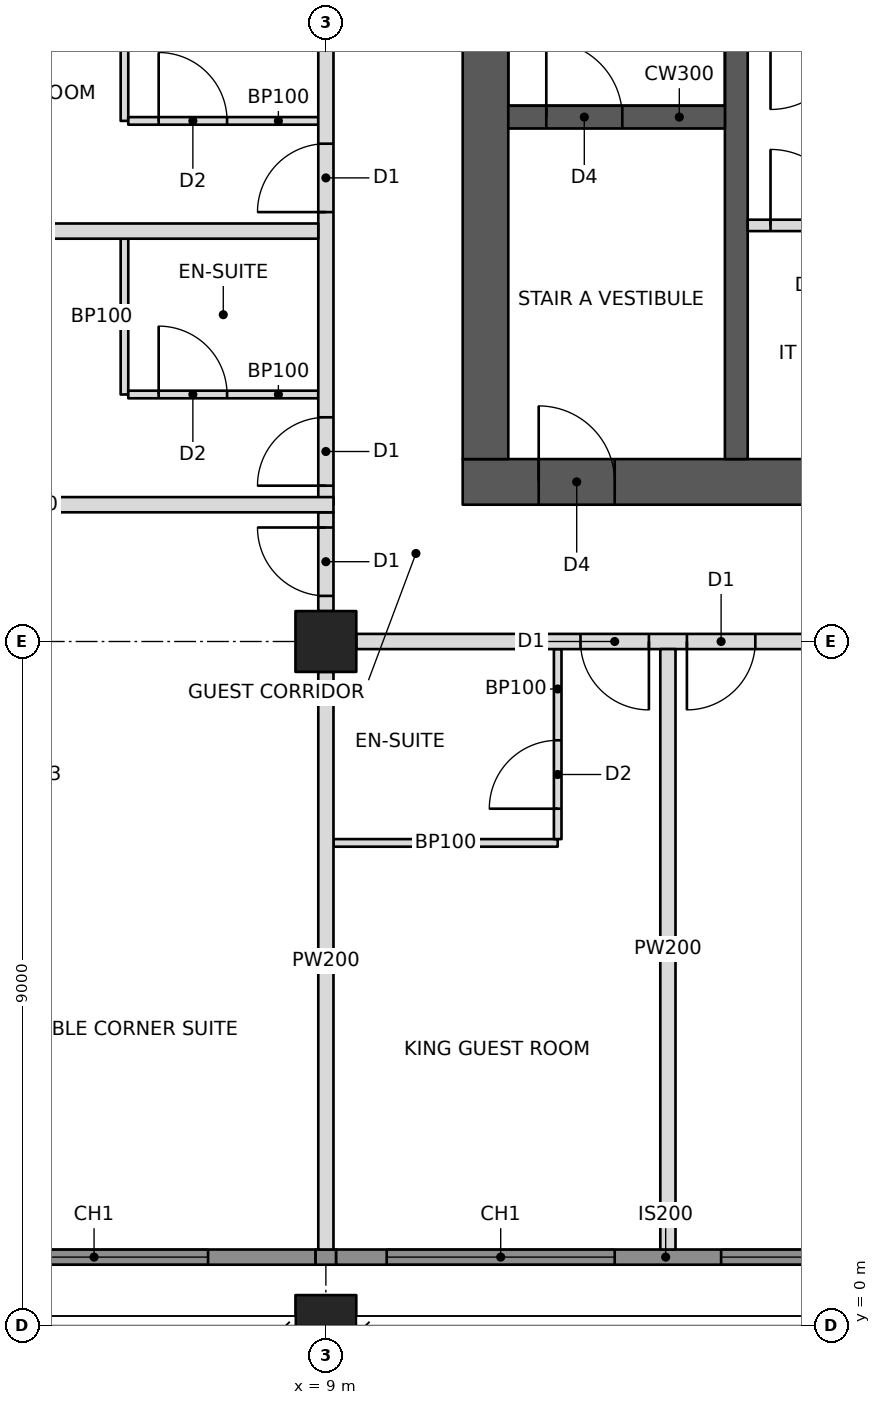
"""IFC4 building model, lengths in metres.
Left out: names, types, materials, properties, quantities, classifications, styles, units other than length and angle.
Written with IfcOpenShell. Run it as: python <this file> out.ifc"""

import sys

from ifc_helpers import new_model, si_unit, direction, frame, frame_2d, origin, origin_2d, place, context, subcontext, project, spatial, rectangle, hollow_rectangle, extrude, element, fill, save


model = new_model("IFC4")
c1 = context("Model", 3, precision=1e-05, world=origin(), true_north=direction((0.0, 1.0)))
c2 = subcontext(c1, "Body", "Model", "MODEL_VIEW")
j1 = project(units=[si_unit("LENGTHUNIT", "METRE"), si_unit("PLANEANGLEUNIT", "RADIAN")], contexts=[c1])
p1 = place(None, origin())
s1 = spatial("IfcSite", under=j1, at=p1, CompositionType="ELEMENT")
p2 = place(p1, origin())
s2 = spatial("IfcBuilding", under=s1, at=p2, CompositionType="ELEMENT")
p3 = place(p2, frame((0.0, 0.0, 230.2)))
s3 = spatial("IfcBuildingStorey", under=s2, at=p3, CompositionType="ELEMENT", Elevation=230.2)
p4 = place(p3, frame((9.0, 0.0, 0.0), z_axis=(0.0, 0.0, 1.0), x_axis=(1.0, 0.0, 0.0)))
e1 = element("IfcColumn", 1, at=p4, inside=s3, PredefinedType="COLUMN", context=c2, shape_type="SweptSolid", body=[
    extrude(hollow_rectangle(XDim=0.8, YDim=0.8, WallThickness=0.05, at=origin_2d()), origin(), (0.0, 0.0, 1.0), 3.6),
])
p5 = place(p3, frame((9.0, 9.0, 0.0), z_axis=(0.0, 0.0, 1.0), x_axis=(1.0, 0.0, 0.0)))
e2 = element("IfcColumn", 2, at=p5, inside=s3, PredefinedType="COLUMN", context=c2, shape_type="SweptSolid", body=[
    extrude(hollow_rectangle(XDim=0.8, YDim=0.8, WallThickness=0.1, at=origin_2d()), origin(), (0.0, 0.0, 1.0), 3.6),
])
p6 = place(p3, frame((10.8, 11.1, 0.0), z_axis=(0.0, 0.0, 1.0), x_axis=(1.0, 0.0, 0.0)))
e3 = element("IfcWall", 3, at=p6, inside=s3, PredefinedType="SHEAR", context=c2, shape_type="SweptSolid", body=[
    extrude(rectangle(XDim=23.4, YDim=0.6, at=frame_2d((11.7, 0.0))), origin(), (0.0, 0.0, 1.0), 3.6),
])
p7 = place(p6, frame((1.0, 0.0, 0.0)))
e4 = element("IfcOpeningElement", 4, at=p7, cuts=e3, PredefinedType="OPENING", context=c2, shape_type="SweptSolid", body=[
    extrude(rectangle(XDim=1.0, YDim=2.1, at=frame_2d((0.5, 1.05))), frame((0.0, 0.31, 0.0), z_axis=(0.0, -1.0, 0.0), x_axis=(1.0, 0.0, 0.0)), (0.0, 0.0, 1.0), 0.62),
])
p8 = place(p6, frame((17.2, 0.0, 0.0)))
e5 = element("IfcOpeningElement", 5, at=p8, cuts=e3, PredefinedType="OPENING", context=c2, shape_type="SweptSolid", body=[
    extrude(rectangle(XDim=1.8, YDim=2.1, at=frame_2d((0.9, 1.05))), frame((0.0, 0.31, 0.0), z_axis=(0.0, -1.0, 0.0), x_axis=(1.0, 0.0, 0.0)), (0.0, 0.0, 1.0), 0.62),
])
p9 = place(p3, frame((11.1, 11.4, 0.0), z_axis=(0.0, 0.0, 1.0), x_axis=(0.0, 1.0, 0.0)))
e6 = element("IfcWall", 6, at=p9, inside=s3, PredefinedType="SHEAR", context=c2, shape_type="SweptSolid", body=[
    extrude(rectangle(XDim=13.2, YDim=0.6, at=frame_2d((6.6, 0.0))), origin(), (0.0, 0.0, 1.0), 3.6),
])
p10 = place(p3, frame((14.4, 11.4, 0.0), z_axis=(0.0, 0.0, 1.0), x_axis=(0.0, 1.0, 0.0)))
e7 = element("IfcWall", 7, at=p10, inside=s3, PredefinedType="SHEAR", context=c2, shape_type="SweptSolid", body=[
    extrude(rectangle(XDim=13.2, YDim=0.3, at=frame_2d((6.6, 0.0))), origin(), (0.0, 0.0, 1.0), 3.6),
])
p11 = place(p3, frame((11.4, 15.9, 0.0), z_axis=(0.0, 0.0, 1.0), x_axis=(1.0, 0.0, 0.0)))
e8 = element("IfcWall", 8, at=p11, inside=s3, PredefinedType="SHEAR", context=c2, shape_type="SweptSolid", body=[
    extrude(rectangle(XDim=2.85, YDim=0.3, at=frame_2d((1.425, 0.0))), origin(), (0.0, 0.0, 1.0), 3.6),
])
p12 = place(p11, frame((0.5, 0.0, 0.0)))
e9 = element("IfcOpeningElement", 9, at=p12, cuts=e8, PredefinedType="OPENING", context=c2, shape_type="SweptSolid", body=[
    extrude(rectangle(XDim=1.0, YDim=2.1, at=frame_2d((0.5, 1.05))), frame((0.0, 0.16, 0.0), z_axis=(0.0, -1.0, 0.0), x_axis=(1.0, 0.0, 0.0)), (0.0, 0.0, 1.0), 0.32),
])
p13 = place(p3, frame((3.0, 0.9, 0.0), z_axis=(0.0, 0.0, 1.0), x_axis=(1.0, 0.0, 0.0)))
e10 = element("IfcWall", 10, at=p13, inside=s3, PredefinedType="SOLIDWALL", context=c2, shape_type="SweptSolid", body=[
    extrude(rectangle(XDim=5.865, YDim=0.2, at=frame_2d((2.932, 0.0))), origin(), (0.0, 0.0, 1.0), 3.4),
])
p14 = place(p13, frame((1.45, 0.0, 0.6)))
e11 = element("IfcOpeningElement", 11, at=p14, cuts=e10, PredefinedType="OPENING", context=c2, shape_type="SweptSolid", body=[
    extrude(rectangle(XDim=3.0, YDim=2.2, at=frame_2d((1.5, 1.1))), frame((0.0, 0.11, 0.0), z_axis=(0.0, -1.0, 0.0), x_axis=(1.0, 0.0, 0.0)), (0.0, 0.0, 1.0), 0.22),
])
p15 = place(p3, frame((9.4, 9.0, 0.0), z_axis=(0.0, 0.0, 1.0), x_axis=(1.0, 0.0, 0.0)))
e12 = element("IfcWall", 12, at=p15, inside=s3, PredefinedType="PARTITIONING", context=c2, shape_type="SweptSolid", body=[
    extrude(rectangle(XDim=8.2, YDim=0.2, at=frame_2d((4.1, 0.0))), origin(), (0.0, 0.0, 1.0), 2.605),
])
p16 = place(p15, frame((2.95, 0.0, 0.0)))
e13 = element("IfcOpeningElement", 13, at=p16, cuts=e12, PredefinedType="OPENING", context=c2, shape_type="SweptSolid", body=[
    extrude(rectangle(XDim=0.9, YDim=2.1, at=frame_2d((0.45, 1.05))), frame((0.0, 0.11, 0.0), z_axis=(0.0, -1.0, 0.0), x_axis=(1.0, 0.0, 0.0)), (0.0, 0.0, 1.0), 0.22),
])
p17 = place(p15, frame((4.35, 0.0, 0.0)))
e14 = element("IfcOpeningElement", 14, at=p17, cuts=e12, PredefinedType="OPENING", context=c2, shape_type="SweptSolid", body=[
    extrude(rectangle(XDim=0.9, YDim=2.1, at=frame_2d((0.45, 1.05))), frame((0.0, 0.11, 0.0), z_axis=(0.0, -1.0, 0.0), x_axis=(1.0, 0.0, 0.0)), (0.0, 0.0, 1.0), 0.22),
])
p18 = place(p3, frame((9.0, 10.8, 0.0), z_axis=(0.0, 0.0, 1.0), x_axis=(0.0, 1.0, 0.0)))
e15 = element("IfcWall", 15, at=p18, inside=s3, PredefinedType="PARTITIONING", context=c2, shape_type="SweptSolid", body=[
    extrude(rectangle(XDim=6.8, YDim=0.2, at=frame_2d((3.4, 0.0))), origin(), (0.0, 0.0, 1.0), 2.605),
])
p19 = place(p18, frame((0.25, 0.0, 0.0)))
e16 = element("IfcOpeningElement", 16, at=p19, cuts=e15, PredefinedType="OPENING", context=c2, shape_type="SweptSolid", body=[
    extrude(rectangle(XDim=0.9, YDim=2.1, at=frame_2d((0.45, 1.05))), frame((0.0, 0.11, 0.0), z_axis=(0.0, -1.0, 0.0), x_axis=(1.0, 0.0, 0.0)), (0.0, 0.0, 1.0), 0.22),
])
p20 = place(p18, frame((3.85, 0.0, 0.0)))
e17 = element("IfcOpeningElement", 17, at=p20, cuts=e15, PredefinedType="OPENING", context=c2, shape_type="SweptSolid", body=[
    extrude(rectangle(XDim=0.9, YDim=2.1, at=frame_2d((0.45, 1.05))), frame((0.0, 0.11, 0.0), z_axis=(0.0, -1.0, 0.0), x_axis=(1.0, 0.0, 0.0)), (0.0, 0.0, 1.0), 0.22),
])
p21 = place(p3, frame((1.0, 10.8, 0.0), z_axis=(0.0, 0.0, 1.0), x_axis=(1.0, 0.0, 0.0)))
e18 = element("IfcWall", 18, at=p21, inside=s3, PredefinedType="PARTITIONING", context=c2, shape_type="SweptSolid", body=[
    extrude(rectangle(XDim=8.1, YDim=0.2, at=frame_2d((4.05, 0.0))), origin(), (0.0, 0.0, 1.0), 2.604),
])
p22 = place(p3, frame((9.0, 8.6, 0.0), z_axis=(0.0, 0.0, 1.0), x_axis=(0.0, -1.0, 0.0)))
e19 = element("IfcWall", 19, at=p22, inside=s3, PredefinedType="PARTITIONING", context=c2, shape_type="SweptSolid", body=[
    extrude(rectangle(XDim=7.6, YDim=0.2, at=frame_2d((3.8, 0.0))), origin(), (0.0, 0.0, 1.0), 2.638),
])
p23 = place(p3, frame((13.5, 8.9, 0.0), z_axis=(0.0, 0.0, 1.0), x_axis=(0.0, -1.0, 0.0)))
e20 = element("IfcWall", 20, at=p23, inside=s3, PredefinedType="PARTITIONING", context=c2, shape_type="SweptSolid", body=[
    extrude(rectangle(XDim=7.9, YDim=0.2, at=frame_2d((3.95, 0.0))), origin(), (0.0, 0.0, 1.0), 2.604),
])
p24 = place(p3, frame((9.1, 6.35, 0.0), z_axis=(0.0, 0.0, 1.0), x_axis=(1.0, 0.0, 0.0)))
e21 = element("IfcWall", 21, at=p24, inside=s3, PredefinedType="PARTITIONING", context=c2, shape_type="SweptSolid", body=[
    extrude(rectangle(XDim=2.95, YDim=0.1, at=frame_2d((1.475, 0.0))), origin(), (0.0, 0.0, 1.0), 2.638),
])
p25 = place(p3, frame((12.05, 8.9, 0.0), z_axis=(0.0, 0.0, 1.0), x_axis=(0.0, -1.0, 0.0)))
e22 = element("IfcWall", 22, at=p25, inside=s3, PredefinedType="PARTITIONING", context=c2, shape_type="SweptSolid", body=[
    extrude(rectangle(XDim=2.5, YDim=0.1, at=frame_2d((1.25, 0.0))), origin(), (0.0, 0.0, 1.0), 2.604),
])
p26 = place(p25, frame((1.2, 0.0, 0.0)))
e23 = element("IfcOpeningElement", 23, at=p26, cuts=e22, PredefinedType="OPENING", context=c2, shape_type="SweptSolid", body=[
    extrude(rectangle(XDim=0.9, YDim=2.1, at=frame_2d((0.45, 1.05))), frame((0.0, 0.06, 0.0), z_axis=(0.0, -1.0, 0.0), x_axis=(1.0, 0.0, 0.0)), (0.0, 0.0, 1.0), 0.12),
])
p27 = place(p3, frame((8.9, 14.4, 0.0), z_axis=(0.0, 0.0, 1.0), x_axis=(-1.0, 0.0, 0.0)))
e24 = element("IfcWall", 24, at=p27, inside=s3, PredefinedType="PARTITIONING", context=c2, shape_type="SweptSolid", body=[
    extrude(rectangle(XDim=7.9, YDim=0.2, at=frame_2d((3.95, 0.0))), origin(), (0.0, 0.0, 1.0), 2.604),
])
p28 = place(p3, frame((6.35, 12.25, 0.0), z_axis=(0.0, 0.0, 1.0), x_axis=(0.0, 1.0, 0.0)))
e25 = element("IfcWall", 25, at=p28, inside=s3, PredefinedType="PARTITIONING", context=c2, shape_type="SweptSolid", body=[
    extrude(rectangle(XDim=2.05, YDim=0.1, at=frame_2d((1.025, 0.0))), origin(), (0.0, 0.0, 1.0), 3.4),
])
p29 = place(p3, frame((8.9, 12.25, 0.0), z_axis=(0.0, 0.0, 1.0), x_axis=(-1.0, 0.0, 0.0)))
e26 = element("IfcWall", 26, at=p29, inside=s3, PredefinedType="PARTITIONING", context=c2, shape_type="SweptSolid", body=[
    extrude(rectangle(XDim=2.5, YDim=0.1, at=frame_2d((1.25, 0.0))), origin(), (0.0, 0.0, 1.0), 2.604),
])
p30 = place(p29, frame((1.2, 0.0, 0.0)))
e27 = element("IfcOpeningElement", 27, at=p30, cuts=e26, PredefinedType="OPENING", context=c2, shape_type="SweptSolid", body=[
    extrude(rectangle(XDim=0.9, YDim=2.1, at=frame_2d((0.45, 1.05))), frame((0.0, 0.06, 0.0), z_axis=(0.0, -1.0, 0.0), x_axis=(1.0, 0.0, 0.0)), (0.0, 0.0, 1.0), 0.12),
])
p31 = place(p3, frame((6.35, 15.85, 0.0), z_axis=(0.0, 0.0, 1.0), x_axis=(0.0, 1.0, 0.0)))
e28 = element("IfcWall", 28, at=p31, inside=s3, PredefinedType="PARTITIONING", context=c2, shape_type="SweptSolid", body=[
    extrude(rectangle(XDim=2.05, YDim=0.1, at=frame_2d((1.025, 0.0))), origin(), (0.0, 0.0, 1.0), 2.604),
])
p32 = place(p3, frame((8.9, 15.85, 0.0), z_axis=(0.0, 0.0, 1.0), x_axis=(-1.0, 0.0, 0.0)))
e29 = element("IfcWall", 29, at=p32, inside=s3, PredefinedType="PARTITIONING", context=c2, shape_type="SweptSolid", body=[
    extrude(rectangle(XDim=2.5, YDim=0.1, at=frame_2d((1.25, 0.0))), origin(), (0.0, 0.0, 1.0), 2.604),
])
p33 = place(p32, frame((1.2, 0.0, 0.0)))
e30 = element("IfcOpeningElement", 30, at=p33, cuts=e29, PredefinedType="OPENING", context=c2, shape_type="SweptSolid", body=[
    extrude(rectangle(XDim=0.9, YDim=2.1, at=frame_2d((0.45, 1.05))), frame((0.0, 0.06, 0.0), z_axis=(0.0, -1.0, 0.0), x_axis=(1.0, 0.0, 0.0)), (0.0, 0.0, 1.0), 0.12),
])
p34 = place(p3, frame((9.0, 9.4, 0.0), z_axis=(0.0, 0.0, 1.0), x_axis=(0.0, 1.0, 0.0)))
e31 = element("IfcWall", 31, at=p34, inside=s3, PredefinedType="PARTITIONING", context=c2, shape_type="SweptSolid", body=[
    extrude(rectangle(XDim=1.3, YDim=0.2, at=frame_2d((0.65, 0.0))), origin(), (0.0, 0.0, 1.0), 2.605),
])
p35 = place(p34, frame((0.2, 0.0, 0.0)))
e32 = element("IfcOpeningElement", 32, at=p35, cuts=e31, PredefinedType="OPENING", context=c2, shape_type="SweptSolid", body=[
    extrude(rectangle(XDim=0.9, YDim=2.1, at=frame_2d((0.45, 1.05))), frame((0.0, 0.11, 0.0), z_axis=(0.0, -1.0, 0.0), x_axis=(1.0, 0.0, 0.0)), (0.0, 0.0, 1.0), 0.22),
])
p36 = place(p3, frame((14.55, 14.475, 0.0), z_axis=(0.0, 0.0, 1.0), x_axis=(1.0, 0.0, 0.0)))
e33 = element("IfcWall", 33, at=p36, inside=s3, PredefinedType="PARTITIONING", context=c2, shape_type="SweptSolid", body=[
    extrude(rectangle(XDim=3.3, YDim=0.15, at=frame_2d((1.65, 0.0))), origin(), (0.0, 0.0, 1.0), 3.4),
])
p37 = place(p36, frame((0.3, 0.0, 0.0)))
e34 = element("IfcOpeningElement", 34, at=p37, cuts=e33, PredefinedType="OPENING", context=c2, shape_type="SweptSolid", body=[
    extrude(rectangle(XDim=1.0, YDim=2.1, at=frame_2d((0.5, 1.05))), frame((0.0, 0.085, 0.0), z_axis=(0.0, -1.0, 0.0), x_axis=(1.0, 0.0, 0.0)), (0.0, 0.0, 1.0), 0.17),
])
p38 = place(p3, frame((8.865, 0.9, 0.0), z_axis=(0.0, 0.0, 1.0), x_axis=(1.0, 0.0, 0.0)))
e35 = element("IfcWall", 35, at=p38, inside=s3, PredefinedType="SOLIDWALL", context=c2, shape_type="SweptSolid", body=[
    extrude(rectangle(XDim=0.271, YDim=0.2, at=frame_2d((0.135, 0.0))), origin(), (0.0, 0.0, 1.0), 2.638),
])
p39 = place(p3, frame((9.135, 0.9, 0.0), z_axis=(0.0, 0.0, 1.0), x_axis=(1.0, 0.0, 0.0)))
e36 = element("IfcWall", 36, at=p39, inside=s3, PredefinedType="SOLIDWALL", context=c2, shape_type="SweptSolid", body=[
    extrude(rectangle(XDim=8.671, YDim=0.2, at=frame_2d((4.335, 0.0))), origin(), (0.0, 0.0, 1.0), 3.4),
])
p40 = place(p39, frame((0.665, 0.0, 0.6)))
e37 = element("IfcOpeningElement", 37, at=p40, cuts=e36, PredefinedType="OPENING", context=c2, shape_type="SweptSolid", body=[
    extrude(rectangle(XDim=3.0, YDim=2.2, at=frame_2d((1.5, 1.1))), frame((0.0, 0.11, 0.0), z_axis=(0.0, -1.0, 0.0), x_axis=(1.0, 0.0, 0.0)), (0.0, 0.0, 1.0), 0.22),
])
p41 = place(p39, frame((5.065, 0.0, 0.6)))
e38 = element("IfcOpeningElement", 38, at=p41, cuts=e36, PredefinedType="OPENING", context=c2, shape_type="SweptSolid", body=[
    extrude(rectangle(XDim=3.0, YDim=2.2, at=frame_2d((1.5, 1.1))), frame((0.0, 0.11, 0.0), z_axis=(0.0, -1.0, 0.0), x_axis=(1.0, 0.0, 0.0)), (0.0, 0.0, 1.0), 0.22),
])
p42 = place(p14, origin())
e39 = element("IfcWindow", 39, at=p42, inside=s3, PartitioningType="TRIPLE_PANEL_VERTICAL", PredefinedType="WINDOW", context=c2, shape_type="SweptSolid", body=[
    extrude(rectangle(XDim=3.0, YDim=2.2, at=frame_2d((1.5, 1.1))), frame((0.0, 0.03, 0.0), z_axis=(0.0, -1.0, 0.0), x_axis=(1.0, 0.0, 0.0)), (0.0, 0.0, 1.0), 0.06),
])
fill(e11, e39)
p43 = place(p40, origin())
e40 = element("IfcWindow", 40, at=p43, inside=s3, PartitioningType="TRIPLE_PANEL_VERTICAL", PredefinedType="WINDOW", context=c2, shape_type="SweptSolid", body=[
    extrude(rectangle(XDim=3.0, YDim=2.2, at=frame_2d((1.5, 1.1))), frame((0.0, 0.03, 0.0), z_axis=(0.0, -1.0, 0.0), x_axis=(1.0, 0.0, 0.0)), (0.0, 0.0, 1.0), 0.06),
])
fill(e37, e40)
p44 = place(p41, origin())
e41 = element("IfcWindow", 41, at=p44, inside=s3, PartitioningType="TRIPLE_PANEL_VERTICAL", PredefinedType="WINDOW", context=c2, shape_type="SweptSolid", body=[
    extrude(rectangle(XDim=3.0, YDim=2.2, at=frame_2d((1.5, 1.1))), frame((0.0, 0.03, 0.0), z_axis=(0.0, -1.0, 0.0), x_axis=(1.0, 0.0, 0.0)), (0.0, 0.0, 1.0), 0.06),
])
fill(e38, e41)
p45 = place(p26, frame((0.9, 0.0, 0.0), z_axis=(0.0, 0.0, 1.0), x_axis=(-1.0, 0.0, 0.0)))
e42 = element("IfcDoor", 42, at=p45, inside=s3, OperationType="SINGLE_SWING_LEFT", PredefinedType="DOOR", context=c2, shape_type="SweptSolid", body=[
    extrude(rectangle(XDim=0.9, YDim=2.1, at=frame_2d((0.45, 1.05))), frame((0.0, 0.025, 0.0), z_axis=(0.0, -1.0, 0.0), x_axis=(1.0, 0.0, 0.0)), (0.0, 0.0, 1.0), 0.05),
])
fill(e23, e42)
p46 = place(p16, frame((0.9, 0.0, 0.0), z_axis=(0.0, 0.0, 1.0), x_axis=(-1.0, 0.0, 0.0)))
e43 = element("IfcDoor", 43, at=p46, inside=s3, OperationType="SINGLE_SWING_LEFT", PredefinedType="DOOR", context=c2, shape_type="SweptSolid", body=[
    extrude(rectangle(XDim=0.9, YDim=2.1, at=frame_2d((0.45, 1.05))), frame((0.0, 0.025, 0.0), z_axis=(0.0, -1.0, 0.0), x_axis=(1.0, 0.0, 0.0)), (0.0, 0.0, 1.0), 0.05),
])
fill(e13, e43)
p47 = place(p17, frame((0.9, 0.0, 0.0), z_axis=(0.0, 0.0, 1.0), x_axis=(-1.0, 0.0, 0.0)))
e44 = element("IfcDoor", 44, at=p47, inside=s3, OperationType="SINGLE_SWING_RIGHT", PredefinedType="DOOR", context=c2, shape_type="SweptSolid", body=[
    extrude(rectangle(XDim=0.9, YDim=2.1, at=frame_2d((0.45, 1.05))), frame((0.0, 0.025, 0.0), z_axis=(0.0, -1.0, 0.0), x_axis=(1.0, 0.0, 0.0)), (0.0, 0.0, 1.0), 0.05),
])
fill(e14, e44)
p48 = place(p30, frame((0.9, 0.0, 0.0), z_axis=(0.0, 0.0, 1.0), x_axis=(-1.0, 0.0, 0.0)))
e45 = element("IfcDoor", 45, at=p48, inside=s3, OperationType="SINGLE_SWING_LEFT", PredefinedType="DOOR", context=c2, shape_type="SweptSolid", body=[
    extrude(rectangle(XDim=0.9, YDim=2.1, at=frame_2d((0.45, 1.05))), frame((0.0, 0.025, 0.0), z_axis=(0.0, -1.0, 0.0), x_axis=(1.0, 0.0, 0.0)), (0.0, 0.0, 1.0), 0.05),
])
fill(e27, e45)
p49 = place(p19, origin())
e46 = element("IfcDoor", 46, at=p49, inside=s3, OperationType="SINGLE_SWING_LEFT", PredefinedType="DOOR", context=c2, shape_type="SweptSolid", body=[
    extrude(rectangle(XDim=0.9, YDim=2.1, at=frame_2d((0.45, 1.05))), frame((0.0, 0.025, 0.0), z_axis=(0.0, -1.0, 0.0), x_axis=(1.0, 0.0, 0.0)), (0.0, 0.0, 1.0), 0.05),
])
fill(e16, e46)
p50 = place(p33, frame((0.9, 0.0, 0.0), z_axis=(0.0, 0.0, 1.0), x_axis=(-1.0, 0.0, 0.0)))
e47 = element("IfcDoor", 47, at=p50, inside=s3, OperationType="SINGLE_SWING_LEFT", PredefinedType="DOOR", context=c2, shape_type="SweptSolid", body=[
    extrude(rectangle(XDim=0.9, YDim=2.1, at=frame_2d((0.45, 1.05))), frame((0.0, 0.025, 0.0), z_axis=(0.0, -1.0, 0.0), x_axis=(1.0, 0.0, 0.0)), (0.0, 0.0, 1.0), 0.05),
])
fill(e30, e47)
p51 = place(p20, origin())
e48 = element("IfcDoor", 48, at=p51, inside=s3, OperationType="SINGLE_SWING_LEFT", PredefinedType="DOOR", context=c2, shape_type="SweptSolid", body=[
    extrude(rectangle(XDim=0.9, YDim=2.1, at=frame_2d((0.45, 1.05))), frame((0.0, 0.025, 0.0), z_axis=(0.0, -1.0, 0.0), x_axis=(1.0, 0.0, 0.0)), (0.0, 0.0, 1.0), 0.05),
])
fill(e17, e48)
p52 = place(p35, origin())
e49 = element("IfcDoor", 49, at=p52, inside=s3, OperationType="SINGLE_SWING_RIGHT", PredefinedType="DOOR", context=c2, shape_type="SweptSolid", body=[
    extrude(rectangle(XDim=0.9, YDim=2.1, at=frame_2d((0.45, 1.05))), frame((0.0, 0.025, 0.0), z_axis=(0.0, -1.0, 0.0), x_axis=(1.0, 0.0, 0.0)), (0.0, 0.0, 1.0), 0.05),
])
fill(e32, e49)
p53 = place(p37, origin())
e50 = element("IfcDoor", 50, at=p53, inside=s3, OperationType="SINGLE_SWING_LEFT", PredefinedType="DOOR", context=c2, shape_type="SweptSolid", body=[
    extrude(rectangle(XDim=1.0, YDim=2.1, at=frame_2d((0.5, 1.05))), frame((0.0, 0.025, 0.0), z_axis=(0.0, -1.0, 0.0), x_axis=(1.0, 0.0, 0.0)), (0.0, 0.0, 1.0), 0.05),
])
fill(e34, e50)
p54 = place(p7, origin())
e51 = element("IfcDoor", 51, at=p54, inside=s3, OperationType="SINGLE_SWING_LEFT", PredefinedType="DOOR", context=c2, shape_type="SweptSolid", body=[
    extrude(rectangle(XDim=1.0, YDim=2.1, at=frame_2d((0.5, 1.05))), frame((0.0, 0.025, 0.0), z_axis=(0.0, -1.0, 0.0), x_axis=(1.0, 0.0, 0.0)), (0.0, 0.0, 1.0), 0.05),
])
fill(e4, e51)
p55 = place(p12, origin())
e52 = element("IfcDoor", 52, at=p55, inside=s3, OperationType="SINGLE_SWING_LEFT", PredefinedType="DOOR", context=c2, shape_type="SweptSolid", body=[
    extrude(rectangle(XDim=1.0, YDim=2.1, at=frame_2d((0.5, 1.05))), frame((0.0, 0.025, 0.0), z_axis=(0.0, -1.0, 0.0), x_axis=(1.0, 0.0, 0.0)), (0.0, 0.0, 1.0), 0.05),
])
fill(e9, e52)
save(model, sys.argv[1])
